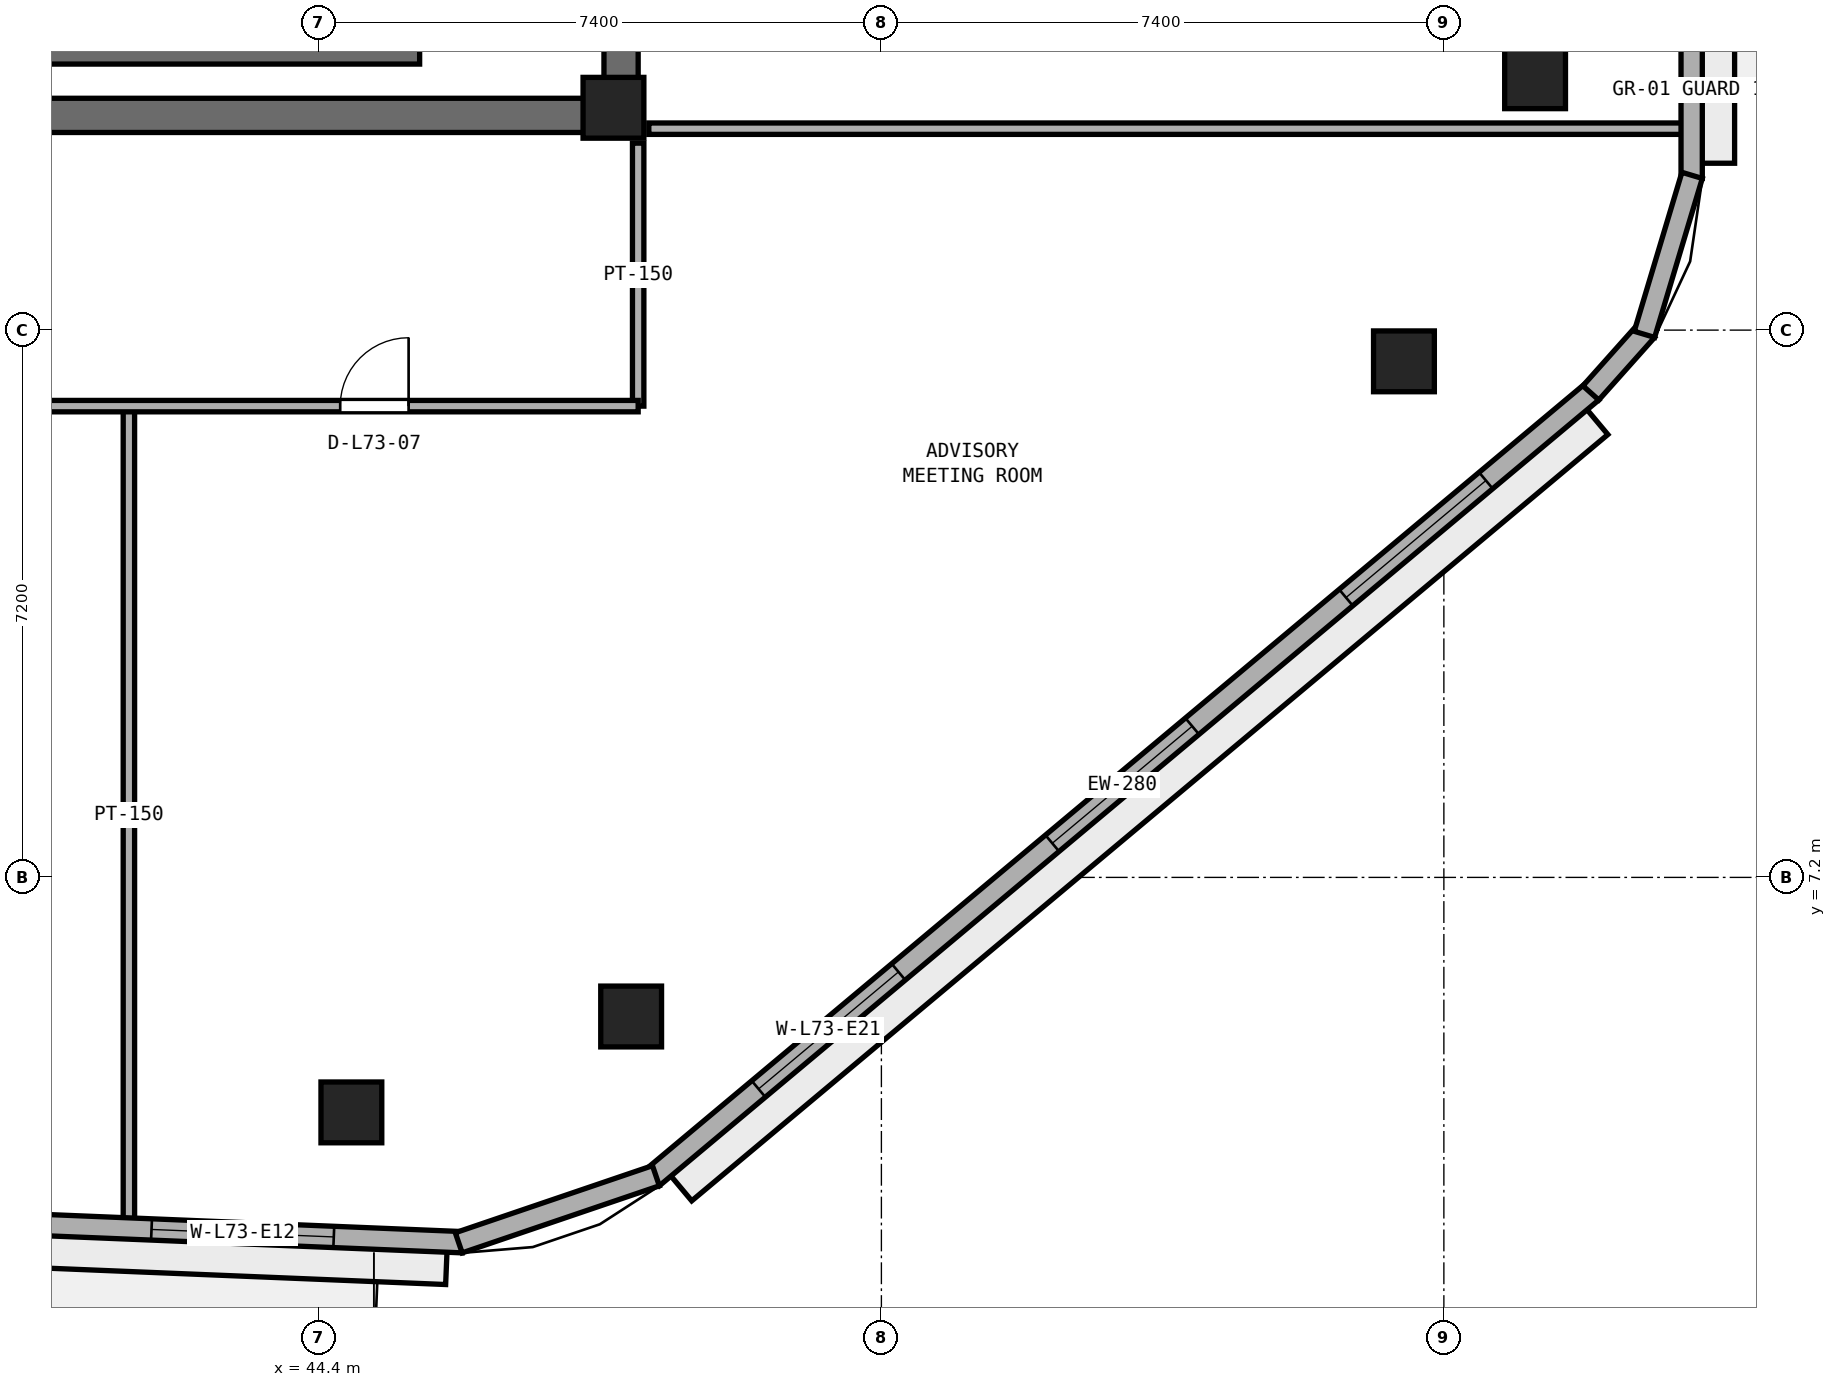
"""IFC4 building model, lengths in metres.
Left out: names, types, materials, properties, quantities, classifications, styles, units other than length and angle.
Written with IfcOpenShell. Run it as: python <this file> out.ifc"""

import sys

from ifc_helpers import new_model, si_unit, direction, frame, frame_2d, origin, origin_2d, place, context, subcontext, project, spatial, rectangle, extrude, element, fill, save


model = new_model("IFC4")
c1 = context("Model", 3, precision=1e-05, world=origin(), true_north=direction((0.0, 1.0)))
c2 = subcontext(c1, "Body", "Model", "MODEL_VIEW")
j1 = project(units=[si_unit("LENGTHUNIT", "METRE"), si_unit("PLANEANGLEUNIT", "RADIAN")], contexts=[c1])
p1 = place(None, origin())
s1 = spatial("IfcSite", under=j1, at=p1, CompositionType="ELEMENT")
p2 = place(p1, origin())
s2 = spatial("IfcBuilding", under=s1, at=p2, CompositionType="ELEMENT")
p3 = place(p2, frame((0.0, 0.0, 285.8)))
s3 = spatial("IfcBuildingStorey", under=s2, at=p3, CompositionType="ELEMENT", Elevation=285.8)
p4 = place(p3, frame((25.4, 17.225, 0.0), z_axis=(0.0, 0.0, 1.0), x_axis=(1.0, 0.0, 0.0)))
e1 = element("IfcWall", 1, at=p4, inside=s3, PredefinedType="SHEAR", context=c2, shape_type="SweptSolid", body=[
    extrude(rectangle(XDim=23.2, YDim=0.45, at=frame_2d((11.6, 0.0))), origin(), (0.0, 0.0, 1.0), 3.54),
])
p5 = place(p3, frame((48.375, 17.45, 0.0), z_axis=(0.0, 0.0, 1.0), x_axis=(0.0, 1.0, 0.0)))
e2 = element("IfcWall", 2, at=p5, inside=s3, PredefinedType="SHEAR", context=c2, shape_type="SweptSolid", body=[
    extrude(rectangle(XDim=15.5, YDim=0.45, at=frame_2d((7.75, 0.0))), origin(), (0.0, 0.0, 1.0), 3.54),
])
p6 = place(p5, frame((5.85, 0.0, 0.0)))
e3 = element("IfcOpeningElement", 3, at=p6, cuts=e2, PredefinedType="OPENING", context=c2, shape_type="SweptSolid", body=[
    extrude(rectangle(XDim=1.5, YDim=2.15, at=frame_2d((0.75, 1.075))), frame((0.0, 0.235, 0.0), z_axis=(0.0, -1.0, 0.0), x_axis=(1.0, 0.0, 0.0)), (0.0, 0.0, 1.0), 0.47),
])
p7 = place(p3, frame((48.275, 17.325, 0.0), z_axis=(0.0, 0.0, 1.0), x_axis=(1.0, 0.0, 0.0)))
e4 = element("IfcColumn", 4, at=p7, inside=s3, PredefinedType="PILASTER", context=c2, shape_type="SweptSolid", body=[
    extrude(rectangle(XDim=0.8, YDim=0.8, at=origin_2d()), origin(), (0.0, 0.0, 1.0), 3.8),
])
for number, where, z_axis, x_axis in (
    (5, (44.827, 4.108, 0.0), (0.0, 0.0, 1.0), (1.0, 0.0, 0.0)),
    (6, (48.508, 5.37, 0.0), (0.0, 0.0, 1.0), (1.0, 0.0, 0.0)),
    (7, (58.675, 13.989, 0.0), (0.0, 0.0, 1.0), (1.0, 0.0, 0.0)),
    (8, (60.4, 17.714, 0.0), (0.0, 0.0, 1.0), (1.0, 0.0, 0.0)),
):
    element("IfcColumn", number, at=place(p3, frame(where, z_axis=z_axis, x_axis=x_axis)), inside=s3, PredefinedType="COLUMN", context=c2, shape_type="SweptSolid", body=[
        extrude(rectangle(XDim=0.8, YDim=0.8, at=origin_2d()), origin(), (0.0, 0.0, 1.0), 3.8),
    ])
p8 = place(p3, frame((38.425, 18.025, 0.0), z_axis=(0.0, 0.0, 1.0), x_axis=(1.0, 0.0, 0.0)))
e9 = element("IfcWall", 9, at=p8, inside=s3, PredefinedType="SHEAR", context=c2, shape_type="SweptSolid", body=[
    extrude(rectangle(XDim=7.3, YDim=0.25, at=frame_2d((3.65, 0.0))), origin(), (0.0, 0.0, 1.0), 3.54),
])
p9 = place(p3, frame((48.6, 13.4, 0.0), z_axis=(0.0, 0.0, 1.0), x_axis=(0.0, 1.0, 0.0)))
e10 = element("IfcWall", 10, at=p9, inside=s3, PredefinedType="PARTITIONING", context=c2, shape_type="SweptSolid", body=[
    extrude(rectangle(XDim=3.46, YDim=0.15, at=frame_2d((1.73, 0.0))), origin(), (0.0, 0.0, 1.0), 3.54),
])
p10 = place(p3, frame((41.9, 2.646, 0.0), z_axis=(0.0, 0.0, 1.0), x_axis=(0.0, 1.0, 0.0)))
e11 = element("IfcWall", 11, at=p10, inside=s3, PredefinedType="PARTITIONING", context=c2, shape_type="SweptSolid", body=[
    extrude(rectangle(XDim=10.754, YDim=0.15, at=frame_2d((5.377, 0.0))), origin(), (0.0, 0.0, 1.0), 3.54),
])
p11 = place(p3, frame((21.8, 13.4, 0.0), z_axis=(0.0, 0.0, 1.0), x_axis=(1.0, 0.0, 0.0)))
e12 = element("IfcWall", 12, at=p11, inside=s3, PredefinedType="PARTITIONING", context=c2, shape_type="SweptSolid", body=[
    extrude(rectangle(XDim=26.8, YDim=0.15, at=frame_2d((13.4, 0.0))), origin(), (0.0, 0.0, 1.0), 3.54),
])
p12 = place(p11, frame((3.92, 0.0, 0.0)))
e13 = element("IfcOpeningElement", 13, at=p12, cuts=e12, PredefinedType="OPENING", context=c2, shape_type="SweptSolid", body=[
    extrude(rectangle(XDim=1.0, YDim=2.12, at=frame_2d((0.5, 1.06))), frame((0.0, 0.085, 0.0), z_axis=(0.0, -1.0, 0.0), x_axis=(1.0, 0.0, 0.0)), (0.0, 0.0, 1.0), 0.17),
])
p13 = place(p11, frame((13.85, 0.0, 0.0)))
e14 = element("IfcOpeningElement", 14, at=p13, cuts=e12, PredefinedType="OPENING", context=c2, shape_type="SweptSolid", body=[
    extrude(rectangle(XDim=1.0, YDim=2.12, at=frame_2d((0.5, 1.06))), frame((0.0, 0.085, 0.0), z_axis=(0.0, -1.0, 0.0), x_axis=(1.0, 0.0, 0.0)), (0.0, 0.0, 1.0), 0.17),
])
p14 = place(p11, frame((22.88, 0.0, 0.0)))
e15 = element("IfcOpeningElement", 15, at=p14, cuts=e12, PredefinedType="OPENING", context=c2, shape_type="SweptSolid", body=[
    extrude(rectangle(XDim=0.9, YDim=2.1, at=frame_2d((0.45, 1.05))), frame((0.0, 0.085, 0.0), z_axis=(0.0, -1.0, 0.0), x_axis=(1.0, 0.0, 0.0)), (0.0, 0.0, 1.0), 0.17),
])
p15 = place(p3, frame((48.74, 17.05, 0.0), z_axis=(0.0, 0.0, 1.0), x_axis=(1.0, 0.0, 0.0)))
e16 = element("IfcWall", 16, at=p15, inside=s3, PredefinedType="PARTITIONING", context=c2, shape_type="SweptSolid", body=[
    extrude(rectangle(XDim=13.655, YDim=0.15, at=frame_2d((6.828, 0.0))), origin(), (0.0, 0.0, 1.0), 2.923),
])
p16 = place(p3, frame((29.428, 3.093, 0.0), z_axis=(0.0, 0.0, 1.0), x_axis=(0.999156257967, -0.041070331944, 0.0)))
e17 = element("IfcWall", 17, at=p16, inside=s3, PredefinedType="STANDARD", context=c2, shape_type="SweptSolid", body=[
    extrude(rectangle(XDim=16.876, YDim=0.28, at=frame_2d((8.438, 0.0))), origin(), (0.0, 0.0, 1.0), 3.54),
])
p17 = place(p16, frame((7.888, 0.0, 0.0)))
e18 = element("IfcOpeningElement", 18, at=p17, cuts=e17, PredefinedType="OPENING", context=c2, shape_type="SweptSolid", body=[
    extrude(rectangle(XDim=1.1, YDim=2.2, at=frame_2d((0.55, 1.1))), frame((0.0, 0.15, 0.0), z_axis=(0.0, -1.0, 0.0), x_axis=(1.0, 0.0, 0.0)), (0.0, 0.0, 1.0), 0.3),
])
p18 = place(p16, frame((1.946, 0.0, 0.9)))
e19 = element("IfcOpeningElement", 19, at=p18, cuts=e17, PredefinedType="OPENING", context=c2, shape_type="SweptSolid", body=[
    extrude(rectangle(XDim=2.4, YDim=1.75, at=frame_2d((1.2, 0.875))), frame((0.0, 0.15, 0.0), z_axis=(0.0, -1.0, 0.0), x_axis=(1.0, 0.0, 0.0)), (0.0, 0.0, 1.0), 0.3),
])
p19 = place(p16, frame((12.78, 0.0, 0.9)))
e20 = element("IfcOpeningElement", 20, at=p19, cuts=e17, PredefinedType="OPENING", context=c2, shape_type="SweptSolid", body=[
    extrude(rectangle(XDim=2.4, YDim=1.75, at=frame_2d((1.2, 0.875))), frame((0.0, 0.15, 0.0), z_axis=(0.0, -1.0, 0.0), x_axis=(1.0, 0.0, 0.0)), (0.0, 0.0, 1.0), 0.3),
])
p20 = place(p3, frame((48.789, 3.25, 0.0), z_axis=(0.0, 0.0, 1.0), x_axis=(0.767032672101, 0.641608042288, 0.0)))
e21 = element("IfcWall", 21, at=p20, inside=s3, PredefinedType="STANDARD", context=c2, shape_type="SweptSolid", body=[
    extrude(rectangle(XDim=16.113, YDim=0.28, at=frame_2d((8.057, 0.0))), origin(), (0.0, 0.0, 1.0), 3.54),
])
p21 = place(p20, frame((1.819, 0.0, 0.9)))
e22 = element("IfcOpeningElement", 22, at=p21, cuts=e21, PredefinedType="OPENING", context=c2, shape_type="SweptSolid", body=[
    extrude(rectangle(XDim=2.4, YDim=1.75, at=frame_2d((1.2, 0.875))), frame((0.0, 0.15, 0.0), z_axis=(0.0, -1.0, 0.0), x_axis=(1.0, 0.0, 0.0)), (0.0, 0.0, 1.0), 0.3),
])
p22 = place(p20, frame((6.857, 0.0, 0.9)))
e23 = element("IfcOpeningElement", 23, at=p22, cuts=e21, PredefinedType="OPENING", context=c2, shape_type="SweptSolid", body=[
    extrude(rectangle(XDim=2.4, YDim=1.75, at=frame_2d((1.2, 0.875))), frame((0.0, 0.15, 0.0), z_axis=(0.0, -1.0, 0.0), x_axis=(1.0, 0.0, 0.0)), (0.0, 0.0, 1.0), 0.3),
])
p23 = place(p20, frame((11.895, 0.0, 0.9)))
e24 = element("IfcOpeningElement", 24, at=p23, cuts=e21, PredefinedType="OPENING", context=c2, shape_type="SweptSolid", body=[
    extrude(rectangle(XDim=2.4, YDim=1.75, at=frame_2d((1.2, 0.875))), frame((0.0, 0.15, 0.0), z_axis=(0.0, -1.0, 0.0), x_axis=(1.0, 0.0, 0.0)), (0.0, 0.0, 1.0), 0.3),
])
p24 = place(p3, frame((62.46, 16.396, 0.0), z_axis=(0.0, 0.0, 1.0), x_axis=(0.0, 1.0, 0.0)))
e25 = element("IfcWall", 25, at=p24, inside=s3, PredefinedType="STANDARD", context=c2, shape_type="SweptSolid", body=[
    extrude(rectangle(XDim=18.854, YDim=0.28, at=frame_2d((9.427, 0.0))), origin(), (0.0, 0.0, 1.0), 3.54),
])
p25 = place(p24, frame((8.877, 0.0, 0.0)))
e26 = element("IfcOpeningElement", 26, at=p25, cuts=e25, PredefinedType="OPENING", context=c2, shape_type="SweptSolid", body=[
    extrude(rectangle(XDim=1.1, YDim=2.2, at=frame_2d((0.55, 1.1))), frame((0.0, 0.15, 0.0), z_axis=(0.0, -1.0, 0.0), x_axis=(1.0, 0.0, 0.0)), (0.0, 0.0, 1.0), 0.3),
])
p26 = place(p24, frame((2.276, 0.0, 0.9)))
e27 = element("IfcOpeningElement", 27, at=p26, cuts=e25, PredefinedType="OPENING", context=c2, shape_type="SweptSolid", body=[
    extrude(rectangle(XDim=2.4, YDim=1.75, at=frame_2d((1.2, 0.875))), frame((0.0, 0.15, 0.0), z_axis=(0.0, -1.0, 0.0), x_axis=(1.0, 0.0, 0.0)), (0.0, 0.0, 1.0), 0.3),
])
p27 = place(p24, frame((14.179, 0.0, 0.9)))
e28 = element("IfcOpeningElement", 28, at=p27, cuts=e25, PredefinedType="OPENING", context=c2, shape_type="SweptSolid", body=[
    extrude(rectangle(XDim=2.4, YDim=1.75, at=frame_2d((1.2, 0.875))), frame((0.0, 0.15, 0.0), z_axis=(0.0, -1.0, 0.0), x_axis=(1.0, 0.0, 0.0)), (0.0, 0.0, 1.0), 0.3),
])
p28 = place(p3, frame((46.24, 2.393, 0.0), z_axis=(0.0, 0.0, 1.0), x_axis=(0.946759165502, 0.321942669643, 0.0)))
e29 = element("IfcWall", 29, at=p28, inside=s3, PredefinedType="STANDARD", context=c2, shape_type="SweptSolid", body=[
    extrude(rectangle(XDim=2.74, YDim=0.28, at=frame_2d((1.37, 0.0))), origin(), (0.0, 0.0, 1.0), 3.54),
])
p29 = place(p3, frame((61.134, 13.574, 0.0), z_axis=(0.0, 0.0, 1.0), x_axis=(0.665804679247, 0.74612608123, 0.0)))
e30 = element("IfcWall", 30, at=p29, inside=s3, PredefinedType="STANDARD", context=c2, shape_type="SweptSolid", body=[
    extrude(rectangle(XDim=1.103, YDim=0.28, at=frame_2d((0.552, 0.0))), origin(), (0.0, 0.0, 1.0), 3.54),
])
p30 = place(p3, frame((61.839, 14.344, 0.0), z_axis=(0.0, 0.0, 1.0), x_axis=(0.287235049694, 0.957860128739, 0.0)))
e31 = element("IfcWall", 31, at=p30, inside=s3, PredefinedType="STANDARD", context=c2, shape_type="SweptSolid", body=[
    extrude(rectangle(XDim=2.184, YDim=0.28, at=frame_2d((1.092, 0.0))), origin(), (0.0, 0.0, 1.0), 3.54),
])
p31 = place(p14, origin())
e32 = element("IfcDoor", 32, at=p31, inside=s3, OperationType="SINGLE_SWING_RIGHT", PredefinedType="DOOR", context=c2, shape_type="SweptSolid", body=[
    extrude(rectangle(XDim=0.9, YDim=2.1, at=frame_2d((0.45, 1.05))), frame((0.0, 0.025, 0.0), z_axis=(0.0, -1.0, 0.0), x_axis=(1.0, 0.0, 0.0)), (0.0, 0.0, 1.0), 0.05),
])
fill(e15, e32)
p32 = place(p19, origin())
e33 = element("IfcWindow", 33, at=p32, inside=s3, PartitioningType="SINGLE_PANEL", PredefinedType="WINDOW", context=c2, shape_type="SweptSolid", body=[
    extrude(rectangle(XDim=2.4, YDim=1.75, at=frame_2d((1.2, 0.875))), frame((0.0, 0.03, 0.0), z_axis=(0.0, -1.0, 0.0), x_axis=(1.0, 0.0, 0.0)), (0.0, 0.0, 1.0), 0.06),
])
fill(e20, e33)
p33 = place(p21, origin())
e34 = element("IfcWindow", 34, at=p33, inside=s3, PartitioningType="SINGLE_PANEL", PredefinedType="WINDOW", context=c2, shape_type="SweptSolid", body=[
    extrude(rectangle(XDim=2.4, YDim=1.75, at=frame_2d((1.2, 0.875))), frame((0.0, 0.03, 0.0), z_axis=(0.0, -1.0, 0.0), x_axis=(1.0, 0.0, 0.0)), (0.0, 0.0, 1.0), 0.06),
])
fill(e22, e34)
p34 = place(p22, origin())
e35 = element("IfcWindow", 35, at=p34, inside=s3, PartitioningType="SINGLE_PANEL", PredefinedType="WINDOW", context=c2, shape_type="SweptSolid", body=[
    extrude(rectangle(XDim=2.4, YDim=1.75, at=frame_2d((1.2, 0.875))), frame((0.0, 0.03, 0.0), z_axis=(0.0, -1.0, 0.0), x_axis=(1.0, 0.0, 0.0)), (0.0, 0.0, 1.0), 0.06),
])
fill(e23, e35)
p35 = place(p23, origin())
e36 = element("IfcWindow", 36, at=p35, inside=s3, PartitioningType="SINGLE_PANEL", PredefinedType="WINDOW", context=c2, shape_type="SweptSolid", body=[
    extrude(rectangle(XDim=2.4, YDim=1.75, at=frame_2d((1.2, 0.875))), frame((0.0, 0.03, 0.0), z_axis=(0.0, -1.0, 0.0), x_axis=(1.0, 0.0, 0.0)), (0.0, 0.0, 1.0), 0.06),
])
fill(e24, e36)
save(model, sys.argv[1])
